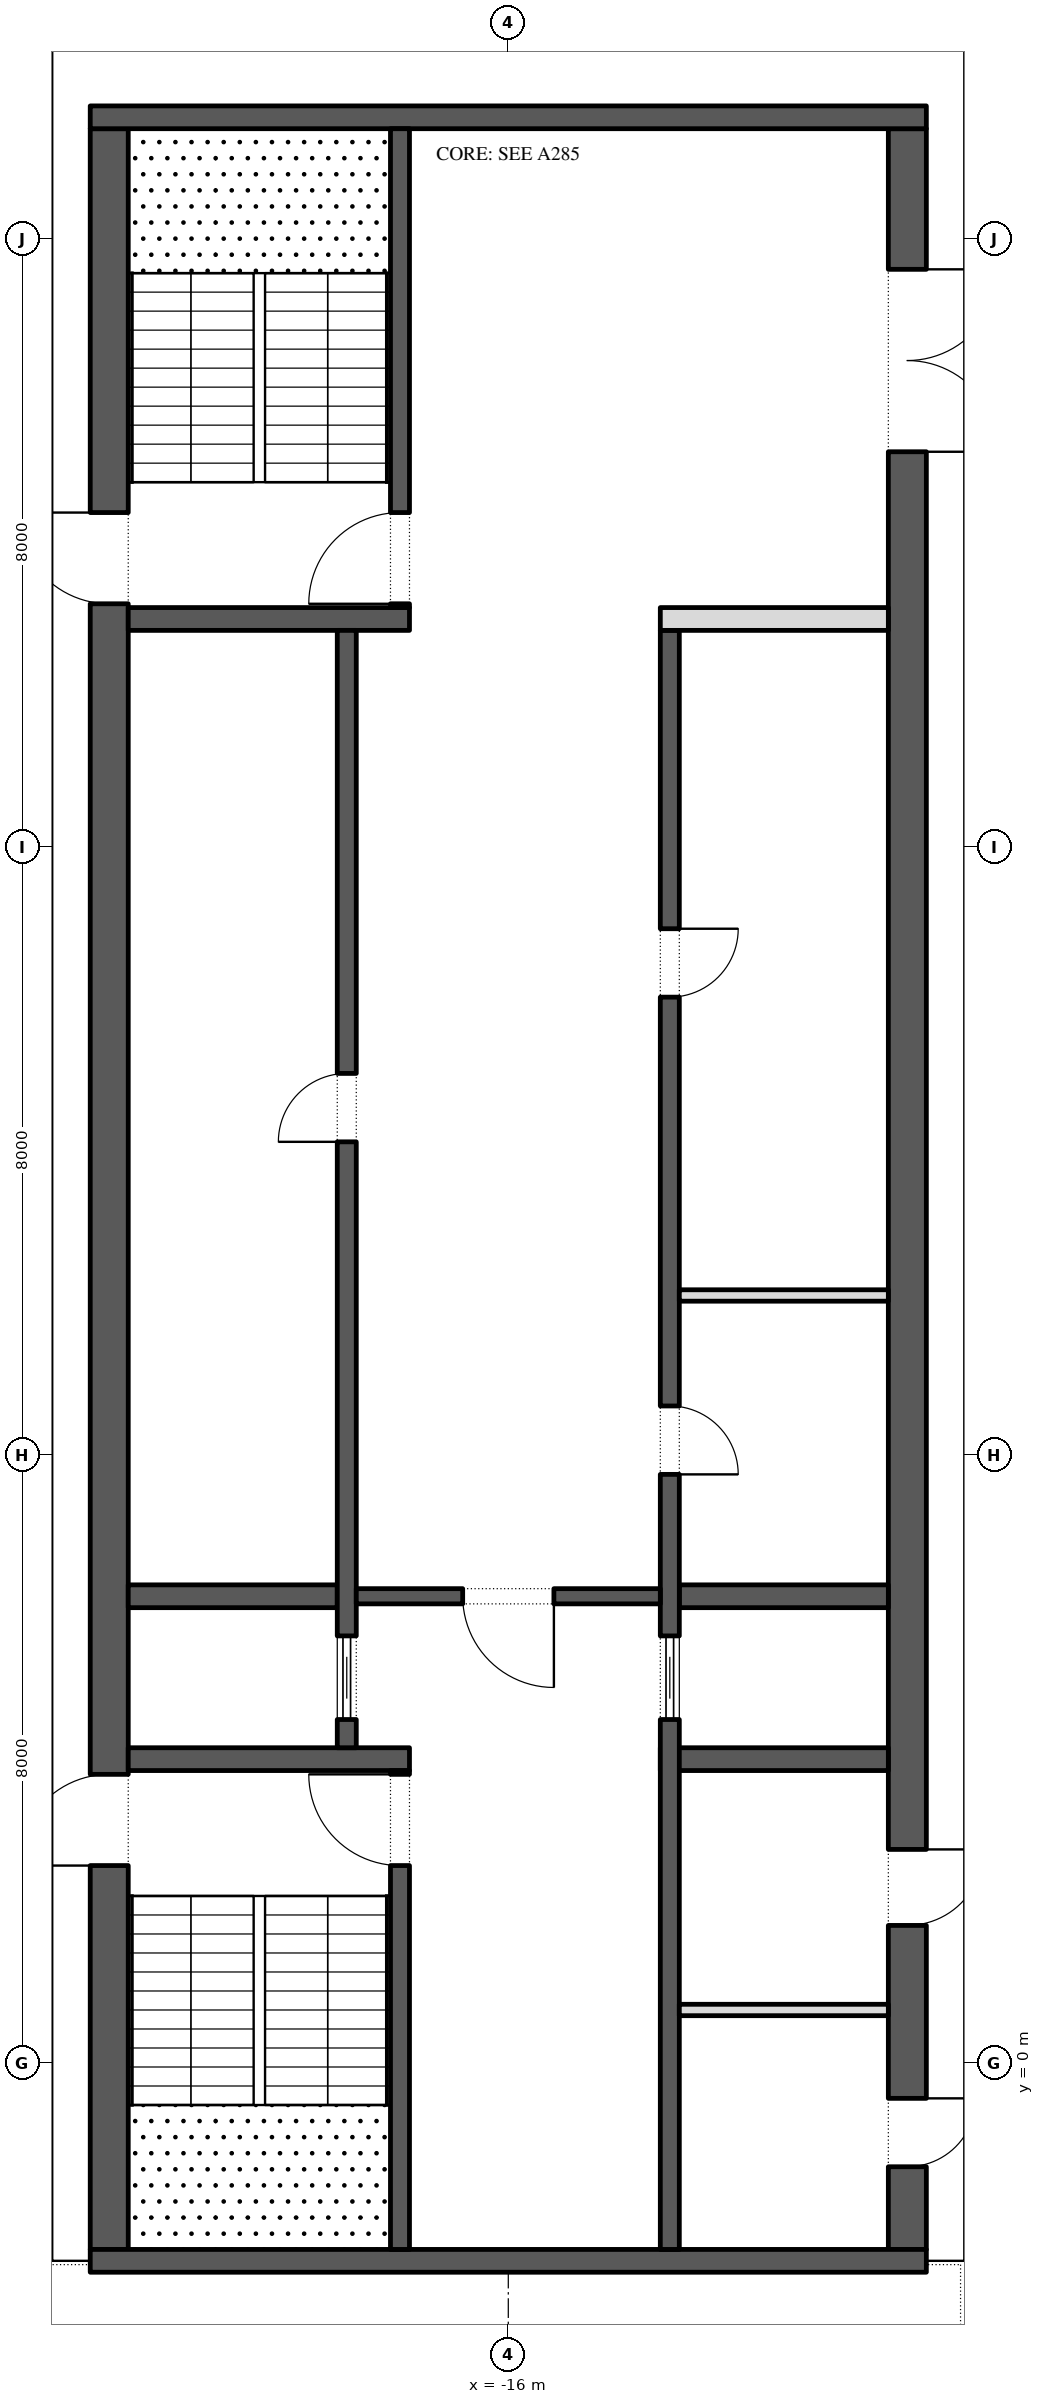
"""IFC4 building model, lengths in metres.
Left out: names, types, materials, properties, quantities, classifications, styles, units other than length and angle.
Written with IfcOpenShell. Run it as: python <this file> out.ifc"""

import sys

from ifc_helpers import new_model, si_unit, direction, frame, frame_2d, origin, place, context, subcontext, project, spatial, rectangle, extrude, element, fill, save


model = new_model("IFC4")
c1 = context("Model", 3, precision=1e-05, world=origin(), true_north=direction((0.0, 1.0)))
c2 = subcontext(c1, "Body", "Model", "MODEL_VIEW")
j1 = project(units=[si_unit("LENGTHUNIT", "METRE"), si_unit("PLANEANGLEUNIT", "RADIAN")], contexts=[c1])
p1 = place(None, origin())
s1 = spatial("IfcSite", under=j1, at=p1, CompositionType="ELEMENT")
p2 = place(p1, origin())
s2 = spatial("IfcBuilding", under=s1, at=p2, CompositionType="ELEMENT")
p3 = place(p2, frame((0.0, 0.0, 373.2)))
s3 = spatial("IfcBuildingStorey", under=s2, at=p3, CompositionType="ELEMENT", Elevation=373.2)
p4 = place(p3, frame((-21.25, -2.45, 0.0), z_axis=(0.0, 0.0, 1.0), x_axis=(0.0, 1.0, 0.0)))
e1 = element("IfcWall", 1, at=p4, inside=s3, PredefinedType="SHEAR", context=c2, shape_type="SweptSolid", body=[
    extrude(rectangle(XDim=27.9, YDim=0.5, at=frame_2d((13.95, 0.0))), origin(), (0.0, 0.0, 1.0), 4.0),
])
p5 = place(p4, frame((5.05, 0.0, 0.0)))
e2 = element("IfcOpeningElement", 2, at=p5, cuts=e1, PredefinedType="OPENING", context=c2, shape_type="SweptSolid", body=[
    extrude(rectangle(XDim=1.2, YDim=2.1, at=frame_2d((0.6, 1.05))), frame((0.0, 0.26, 0.0), z_axis=(0.0, -1.0, 0.0), x_axis=(1.0, 0.0, 0.0)), (0.0, 0.0, 1.0), 0.52),
])
p6 = place(p4, frame((21.65, 0.0, 0.0)))
e3 = element("IfcOpeningElement", 3, at=p6, cuts=e1, PredefinedType="OPENING", context=c2, shape_type="SweptSolid", body=[
    extrude(rectangle(XDim=1.2, YDim=2.1, at=frame_2d((0.6, 1.05))), frame((0.0, 0.26, 0.0), z_axis=(0.0, -1.0, 0.0), x_axis=(1.0, 0.0, 0.0)), (0.0, 0.0, 1.0), 0.52),
])
p7 = place(p3, frame((-10.75, -2.45, 0.0), z_axis=(0.0, 0.0, 1.0), x_axis=(0.0, 1.0, 0.0)))
e4 = element("IfcWall", 4, at=p7, inside=s3, PredefinedType="SHEAR", context=c2, shape_type="SweptSolid", body=[
    extrude(rectangle(XDim=27.9, YDim=0.5, at=frame_2d((13.95, 0.0))), origin(), (0.0, 0.0, 1.0), 4.0),
])
p8 = place(p7, frame((23.65, 0.0, 0.0)))
e5 = element("IfcOpeningElement", 5, at=p8, cuts=e4, PredefinedType="OPENING", context=c2, shape_type="SweptSolid", body=[
    extrude(rectangle(XDim=2.4, YDim=2.1, at=frame_2d((1.2, 1.05))), frame((0.0, 0.26, 0.0), z_axis=(0.0, -1.0, 0.0), x_axis=(1.0, 0.0, 0.0)), (0.0, 0.0, 1.0), 0.52),
])
p9 = place(p7, frame((1.087, 0.0, 0.0)))
e6 = element("IfcOpeningElement", 6, at=p9, cuts=e4, PredefinedType="OPENING", context=c2, shape_type="SweptSolid", body=[
    extrude(rectangle(XDim=0.9, YDim=2.1, at=frame_2d((0.45, 1.05))), frame((0.0, 0.26, 0.0), z_axis=(0.0, -1.0, 0.0), x_axis=(1.0, 0.0, 0.0)), (0.0, 0.0, 1.0), 0.52),
])
p10 = place(p7, frame((4.262, 0.0, 0.0)))
e7 = element("IfcOpeningElement", 7, at=p10, cuts=e4, PredefinedType="OPENING", context=c2, shape_type="SweptSolid", body=[
    extrude(rectangle(XDim=1.0, YDim=2.1, at=frame_2d((0.5, 1.05))), frame((0.0, 0.26, 0.0), z_axis=(0.0, -1.0, 0.0), x_axis=(1.0, 0.0, 0.0)), (0.0, 0.0, 1.0), 0.52),
])
for number, where, z_axis, x_axis in (
    (8, (-21.5, -2.6, 0.0), (0.0, 0.0, 1.0), (1.0, 0.0, 0.0)),
    (9, (-21.5, 25.6, 0.0), (0.0, 0.0, 1.0), (1.0, 0.0, 0.0)),
):
    element("IfcWall", number, at=place(p3, frame(where, z_axis=z_axis, x_axis=x_axis)), inside=s3, PredefinedType="SHEAR", context=c2, shape_type="SweptSolid", body=[
        extrude(rectangle(XDim=11.0, YDim=0.3, at=frame_2d((5.5, 0.0))), origin(), (0.0, 0.0, 1.0), 4.0),
    ])
p11 = place(p3, frame((-21.0, 4.0, 0.0), z_axis=(0.0, 0.0, 1.0), x_axis=(1.0, 0.0, 0.0)))
e10 = element("IfcWall", 10, at=p11, inside=s3, PredefinedType="SHEAR", context=c2, shape_type="SweptSolid", body=[
    extrude(rectangle(XDim=3.7, YDim=0.3, at=frame_2d((1.85, 0.0))), origin(), (0.0, 0.0, 1.0), 4.0),
])
p12 = place(p3, frame((-17.425, -2.45, 0.0), z_axis=(0.0, 0.0, 1.0), x_axis=(0.0, 1.0, 0.0)))
e11 = element("IfcWall", 11, at=p12, inside=s3, PredefinedType="SHEAR", context=c2, shape_type="SweptSolid", body=[
    extrude(rectangle(XDim=6.3, YDim=0.25, at=frame_2d((3.15, 0.0))), origin(), (0.0, 0.0, 1.0), 4.0),
])
p13 = place(p12, frame((5.05, 0.0, 0.0)))
e12 = element("IfcOpeningElement", 12, at=p13, cuts=e11, PredefinedType="OPENING", context=c2, shape_type="SweptSolid", body=[
    extrude(rectangle(XDim=1.2, YDim=2.1, at=frame_2d((0.6, 1.05))), frame((0.0, 0.135, 0.0), z_axis=(0.0, -1.0, 0.0), x_axis=(1.0, 0.0, 0.0)), (0.0, 0.0, 1.0), 0.27),
])
p14 = place(p3, frame((-21.0, 19.0, 0.0), z_axis=(0.0, 0.0, 1.0), x_axis=(1.0, 0.0, 0.0)))
e13 = element("IfcWall", 13, at=p14, inside=s3, PredefinedType="SHEAR", context=c2, shape_type="SweptSolid", body=[
    extrude(rectangle(XDim=3.7, YDim=0.3, at=frame_2d((1.85, 0.0))), origin(), (0.0, 0.0, 1.0), 4.0),
])
p15 = place(p3, frame((-17.425, 19.15, 0.0), z_axis=(0.0, 0.0, 1.0), x_axis=(0.0, 1.0, 0.0)))
e14 = element("IfcWall", 14, at=p15, inside=s3, PredefinedType="SHEAR", context=c2, shape_type="SweptSolid", body=[
    extrude(rectangle(XDim=6.3, YDim=0.25, at=frame_2d((3.15, 0.0))), origin(), (0.0, 0.0, 1.0), 4.0),
])
p16 = place(p15, frame((0.05, 0.0, 0.0)))
e15 = element("IfcOpeningElement", 15, at=p16, cuts=e14, PredefinedType="OPENING", context=c2, shape_type="SweptSolid", body=[
    extrude(rectangle(XDim=1.2, YDim=2.1, at=frame_2d((0.6, 1.05))), frame((0.0, 0.135, 0.0), z_axis=(0.0, -1.0, 0.0), x_axis=(1.0, 0.0, 0.0)), (0.0, 0.0, 1.0), 0.27),
])
p17 = place(p3, frame((-21.0, 6.143, 0.0), z_axis=(0.0, 0.0, 1.0), x_axis=(1.0, 0.0, 0.0)))
e16 = element("IfcWall", 16, at=p17, inside=s3, PredefinedType="SHEAR", context=c2, shape_type="SweptSolid", body=[
    extrude(rectangle(XDim=2.75, YDim=0.3, at=frame_2d((1.375, 0.0))), origin(), (0.0, 0.0, 1.0), 4.0),
])
p18 = place(p3, frame((-18.125, 4.15, 0.0), z_axis=(0.0, 0.0, 1.0), x_axis=(0.0, 1.0, 0.0)))
e17 = element("IfcWall", 17, at=p18, inside=s3, PredefinedType="SHEAR", context=c2, shape_type="SweptSolid", body=[
    extrude(rectangle(XDim=14.7, YDim=0.25, at=frame_2d((7.35, 0.0))), origin(), (0.0, 0.0, 1.0), 4.0),
])
p19 = place(p18, frame((7.971, 0.0, 0.0)))
e18 = element("IfcOpeningElement", 18, at=p19, cuts=e17, PredefinedType="OPENING", context=c2, shape_type="SweptSolid", body=[
    extrude(rectangle(XDim=0.9, YDim=2.1, at=frame_2d((0.45, 1.05))), frame((0.0, 0.135, 0.0), z_axis=(0.0, -1.0, 0.0), x_axis=(1.0, 0.0, 0.0)), (0.0, 0.0, 1.0), 0.27),
])
p20 = place(p18, frame((0.371, 0.0, 0.0)))
e19 = element("IfcOpeningElement", 19, at=p20, cuts=e17, PredefinedType="OPENING", context=c2, shape_type="SweptSolid", body=[
    extrude(rectangle(XDim=1.1, YDim=2.1, at=frame_2d((0.55, 1.05))), frame((0.0, 0.135, 0.0), z_axis=(0.0, -1.0, 0.0), x_axis=(1.0, 0.0, 0.0)), (0.0, 0.0, 1.0), 0.27),
])
p21 = place(p3, frame((-14.0, 4.0, 0.0), z_axis=(0.0, 0.0, 1.0), x_axis=(1.0, 0.0, 0.0)))
e20 = element("IfcWall", 20, at=p21, inside=s3, PredefinedType="SHEAR", context=c2, shape_type="SweptSolid", body=[
    extrude(rectangle(XDim=3.0, YDim=0.3, at=frame_2d((1.5, 0.0))), origin(), (0.0, 0.0, 1.0), 4.0),
])
p22 = place(p3, frame((-13.75, 6.143, 0.0), z_axis=(0.0, 0.0, 1.0), x_axis=(1.0, 0.0, 0.0)))
e21 = element("IfcWall", 21, at=p22, inside=s3, PredefinedType="SHEAR", context=c2, shape_type="SweptSolid", body=[
    extrude(rectangle(XDim=2.75, YDim=0.3, at=frame_2d((1.375, 0.0))), origin(), (0.0, 0.0, 1.0), 4.0),
])
p23 = place(p3, frame((-13.875, -2.45, 0.0), z_axis=(0.0, 0.0, 1.0), x_axis=(0.0, 1.0, 0.0)))
e22 = element("IfcWall", 22, at=p23, inside=s3, PredefinedType="SHEAR", context=c2, shape_type="SweptSolid", body=[
    extrude(rectangle(XDim=21.3, YDim=0.25, at=frame_2d((10.65, 0.0))), origin(), (0.0, 0.0, 1.0), 4.0),
])
p24 = place(p23, frame((10.196, 0.0, 0.0)))
e23 = element("IfcOpeningElement", 23, at=p24, cuts=e22, PredefinedType="OPENING", context=c2, shape_type="SweptSolid", body=[
    extrude(rectangle(XDim=0.9, YDim=2.1, at=frame_2d((0.45, 1.05))), frame((0.0, 0.135, 0.0), z_axis=(0.0, -1.0, 0.0), x_axis=(1.0, 0.0, 0.0)), (0.0, 0.0, 1.0), 0.27),
])
p25 = place(p23, frame((16.475, 0.0, 0.0)))
e24 = element("IfcOpeningElement", 24, at=p25, cuts=e22, PredefinedType="OPENING", context=c2, shape_type="SweptSolid", body=[
    extrude(rectangle(XDim=0.9, YDim=2.1, at=frame_2d((0.45, 1.05))), frame((0.0, 0.135, 0.0), z_axis=(0.0, -1.0, 0.0), x_axis=(1.0, 0.0, 0.0)), (0.0, 0.0, 1.0), 0.27),
])
p26 = place(p23, frame((6.971, 0.0, 0.0)))
e25 = element("IfcOpeningElement", 25, at=p26, cuts=e22, PredefinedType="OPENING", context=c2, shape_type="SweptSolid", body=[
    extrude(rectangle(XDim=1.1, YDim=2.1, at=frame_2d((0.55, 1.05))), frame((0.0, 0.135, 0.0), z_axis=(0.0, -1.0, 0.0), x_axis=(1.0, 0.0, 0.0)), (0.0, 0.0, 1.0), 0.27),
])
p27 = place(p3, frame((-14.0, 19.0, 0.0), z_axis=(0.0, 0.0, 1.0), x_axis=(1.0, 0.0, 0.0)))
e26 = element("IfcWall", 26, at=p27, inside=s3, PredefinedType="PARTITIONING", context=c2, shape_type="SweptSolid", body=[
    extrude(rectangle(XDim=3.0, YDim=0.3, at=frame_2d((1.5, 0.0))), origin(), (0.0, 0.0, 1.0), 4.0),
])
p28 = place(p3, frame((-13.75, 10.1, 0.0), z_axis=(0.0, 0.0, 1.0), x_axis=(1.0, 0.0, 0.0)))
e27 = element("IfcWall", 27, at=p28, inside=s3, PredefinedType="PARTITIONING", context=c2, shape_type="SweptSolid", body=[
    extrude(rectangle(XDim=2.75, YDim=0.15, at=frame_2d((1.375, 0.0))), origin(), (0.0, 0.0, 1.0), 4.0),
])
p29 = place(p3, frame((-18.0, 6.143, 0.0), z_axis=(0.0, 0.0, 1.0), x_axis=(1.0, 0.0, 0.0)))
e28 = element("IfcWall", 28, at=p29, inside=s3, PredefinedType="SHEAR", context=c2, shape_type="SweptSolid", body=[
    extrude(rectangle(XDim=4.0, YDim=0.2, at=frame_2d((2.0, 0.0))), origin(), (0.0, 0.0, 1.0), 4.0),
])
p30 = place(p29, frame((1.4, 0.0, 0.0)))
e29 = element("IfcOpeningElement", 29, at=p30, cuts=e28, PredefinedType="OPENING", context=c2, shape_type="SweptSolid", body=[
    extrude(rectangle(XDim=1.2, YDim=2.1, at=frame_2d((0.6, 1.05))), frame((0.0, 0.11, 0.0), z_axis=(0.0, -1.0, 0.0), x_axis=(1.0, 0.0, 0.0)), (0.0, 0.0, 1.0), 0.22),
])
p31 = place(p3, frame((-13.75, 0.7, 0.0), z_axis=(0.0, 0.0, 1.0), x_axis=(1.0, 0.0, 0.0)))
e30 = element("IfcWall", 30, at=p31, inside=s3, PredefinedType="PARTITIONING", context=c2, shape_type="SweptSolid", body=[
    extrude(rectangle(XDim=2.75, YDim=0.15, at=frame_2d((1.375, 0.0))), origin(), (0.0, 0.0, 1.0), 4.0),
])
p32 = place(p19, origin())
e31 = element("IfcDoor", 31, at=p32, inside=s3, OperationType="SINGLE_SWING_RIGHT", PredefinedType="DOOR", context=c2, shape_type="SweptSolid", body=[
    extrude(rectangle(XDim=0.9, YDim=2.1, at=frame_2d((0.45, 1.05))), frame((0.0, 0.125, 0.0), z_axis=(0.0, -1.0, 0.0), x_axis=(1.0, 0.0, 0.0)), (0.0, 0.0, 1.0), 0.05),
])
fill(e18, e31)
p33 = place(p20, origin())
e32 = element("IfcDoor", 32, at=p33, inside=s3, OperationType="SLIDING_TO_LEFT", PredefinedType="DOOR", context=c2, shape_type="SweptSolid", body=[
    extrude(rectangle(XDim=1.1, YDim=2.1, at=frame_2d((0.55, 1.05))), frame((0.0, 0.025, 0.0), z_axis=(0.0, -1.0, 0.0), x_axis=(1.0, 0.0, 0.0)), (0.0, 0.0, 1.0), 0.05),
])
fill(e19, e32)
p34 = place(p24, frame((0.9, -0.2, 0.0), z_axis=(0.0, 0.0, 1.0), x_axis=(-1.0, 0.0, 0.0)))
e33 = element("IfcDoor", 33, at=p34, inside=s3, OperationType="SINGLE_SWING_LEFT", PredefinedType="DOOR", context=c2, shape_type="SweptSolid", body=[
    extrude(rectangle(XDim=0.9, YDim=2.1, at=frame_2d((0.45, 1.05))), frame((0.0, -0.075, 0.0), z_axis=(0.0, -1.0, 0.0), x_axis=(1.0, 0.0, 0.0)), (0.0, 0.0, 1.0), 0.05),
])
fill(e23, e33)
p35 = place(p25, frame((0.9, -0.2, 0.0), z_axis=(0.0, 0.0, 1.0), x_axis=(-1.0, 0.0, 0.0)))
e34 = element("IfcDoor", 34, at=p35, inside=s3, OperationType="SINGLE_SWING_RIGHT", PredefinedType="DOOR", context=c2, shape_type="SweptSolid", body=[
    extrude(rectangle(XDim=0.9, YDim=2.1, at=frame_2d((0.45, 1.05))), frame((0.0, -0.075, 0.0), z_axis=(0.0, -1.0, 0.0), x_axis=(1.0, 0.0, 0.0)), (0.0, 0.0, 1.0), 0.05),
])
fill(e24, e34)
p36 = place(p26, origin())
e35 = element("IfcDoor", 35, at=p36, inside=s3, OperationType="SLIDING_TO_LEFT", PredefinedType="DOOR", context=c2, shape_type="SweptSolid", body=[
    extrude(rectangle(XDim=1.1, YDim=2.1, at=frame_2d((0.55, 1.05))), frame((0.0, 0.025, 0.0), z_axis=(0.0, -1.0, 0.0), x_axis=(1.0, 0.0, 0.0)), (0.0, 0.0, 1.0), 0.05),
])
fill(e25, e35)
p37 = place(p30, frame((1.2, 0.0, 0.0), z_axis=(0.0, 0.0, 1.0), x_axis=(-1.0, 0.0, 0.0)))
e36 = element("IfcDoor", 36, at=p37, inside=s3, OperationType="SINGLE_SWING_RIGHT", PredefinedType="DOOR", context=c2, shape_type="SweptSolid", body=[
    extrude(rectangle(XDim=1.2, YDim=2.1, at=frame_2d((0.6, 1.05))), frame((0.0, 0.025, 0.0), z_axis=(0.0, -1.0, 0.0), x_axis=(1.0, 0.0, 0.0)), (0.0, 0.0, 1.0), 0.05),
])
fill(e29, e36)
p38 = place(p8, frame((2.4, 0.0, 0.0), z_axis=(0.0, 0.0, 1.0), x_axis=(-1.0, 0.0, 0.0)))
e37 = element("IfcDoor", 37, at=p38, inside=s3, OperationType="DOUBLE_DOOR_SINGLE_SWING", PredefinedType="DOOR", context=c2, shape_type="SweptSolid", body=[
    extrude(rectangle(XDim=2.4, YDim=2.1, at=frame_2d((1.2, 1.05))), frame((0.0, 0.025, 0.0), z_axis=(0.0, -1.0, 0.0), x_axis=(1.0, 0.0, 0.0)), (0.0, 0.0, 1.0), 0.05),
])
fill(e5, e37)
p39 = place(p13, origin())
e38 = element("IfcDoor", 38, at=p39, inside=s3, OperationType="SINGLE_SWING_LEFT", PredefinedType="DOOR", context=c2, shape_type="SweptSolid", body=[
    extrude(rectangle(XDim=1.2, YDim=2.1, at=frame_2d((0.6, 1.05))), frame((0.0, 0.025, 0.0), z_axis=(0.0, -1.0, 0.0), x_axis=(1.0, 0.0, 0.0)), (0.0, 0.0, 1.0), 0.05),
])
fill(e12, e38)
p40 = place(p5, origin())
e39 = element("IfcDoor", 39, at=p40, inside=s3, OperationType="SINGLE_SWING_RIGHT", PredefinedType="DOOR", context=c2, shape_type="SweptSolid", body=[
    extrude(rectangle(XDim=1.2, YDim=2.1, at=frame_2d((0.6, 1.05))), frame((0.0, 0.025, 0.0), z_axis=(0.0, -1.0, 0.0), x_axis=(1.0, 0.0, 0.0)), (0.0, 0.0, 1.0), 0.05),
])
fill(e2, e39)
p41 = place(p16, origin())
e40 = element("IfcDoor", 40, at=p41, inside=s3, OperationType="SINGLE_SWING_RIGHT", PredefinedType="DOOR", context=c2, shape_type="SweptSolid", body=[
    extrude(rectangle(XDim=1.2, YDim=2.1, at=frame_2d((0.6, 1.05))), frame((0.0, 0.025, 0.0), z_axis=(0.0, -1.0, 0.0), x_axis=(1.0, 0.0, 0.0)), (0.0, 0.0, 1.0), 0.05),
])
fill(e15, e40)
p42 = place(p6, origin())
e41 = element("IfcDoor", 41, at=p42, inside=s3, OperationType="SINGLE_SWING_LEFT", PredefinedType="DOOR", context=c2, shape_type="SweptSolid", body=[
    extrude(rectangle(XDim=1.2, YDim=2.1, at=frame_2d((0.6, 1.05))), frame((0.0, 0.025, 0.0), z_axis=(0.0, -1.0, 0.0), x_axis=(1.0, 0.0, 0.0)), (0.0, 0.0, 1.0), 0.05),
])
fill(e3, e41)
p43 = place(p9, frame((0.9, 0.45, 0.0), z_axis=(0.0, 0.0, 1.0), x_axis=(-1.0, 0.0, 0.0)))
e42 = element("IfcDoor", 42, at=p43, inside=s3, OperationType="SINGLE_SWING_RIGHT", PredefinedType="DOOR", context=c2, shape_type="SweptSolid", body=[
    extrude(rectangle(XDim=0.9, YDim=2.1, at=frame_2d((0.45, 1.05))), frame((0.0, 0.25, 0.0), z_axis=(0.0, -1.0, 0.0), x_axis=(1.0, 0.0, 0.0)), (0.0, 0.0, 1.0), 0.05),
])
fill(e6, e42)
p44 = place(p10, frame((1.0, 0.45, 0.0), z_axis=(0.0, 0.0, 1.0), x_axis=(-1.0, 0.0, 0.0)))
e43 = element("IfcDoor", 43, at=p44, inside=s3, OperationType="SINGLE_SWING_RIGHT", PredefinedType="DOOR", context=c2, shape_type="SweptSolid", body=[
    extrude(rectangle(XDim=1.0, YDim=2.1, at=frame_2d((0.5, 1.05))), frame((0.0, 0.25, 0.0), z_axis=(0.0, -1.0, 0.0), x_axis=(1.0, 0.0, 0.0)), (0.0, 0.0, 1.0), 0.05),
])
fill(e7, e43)
save(model, sys.argv[1])
